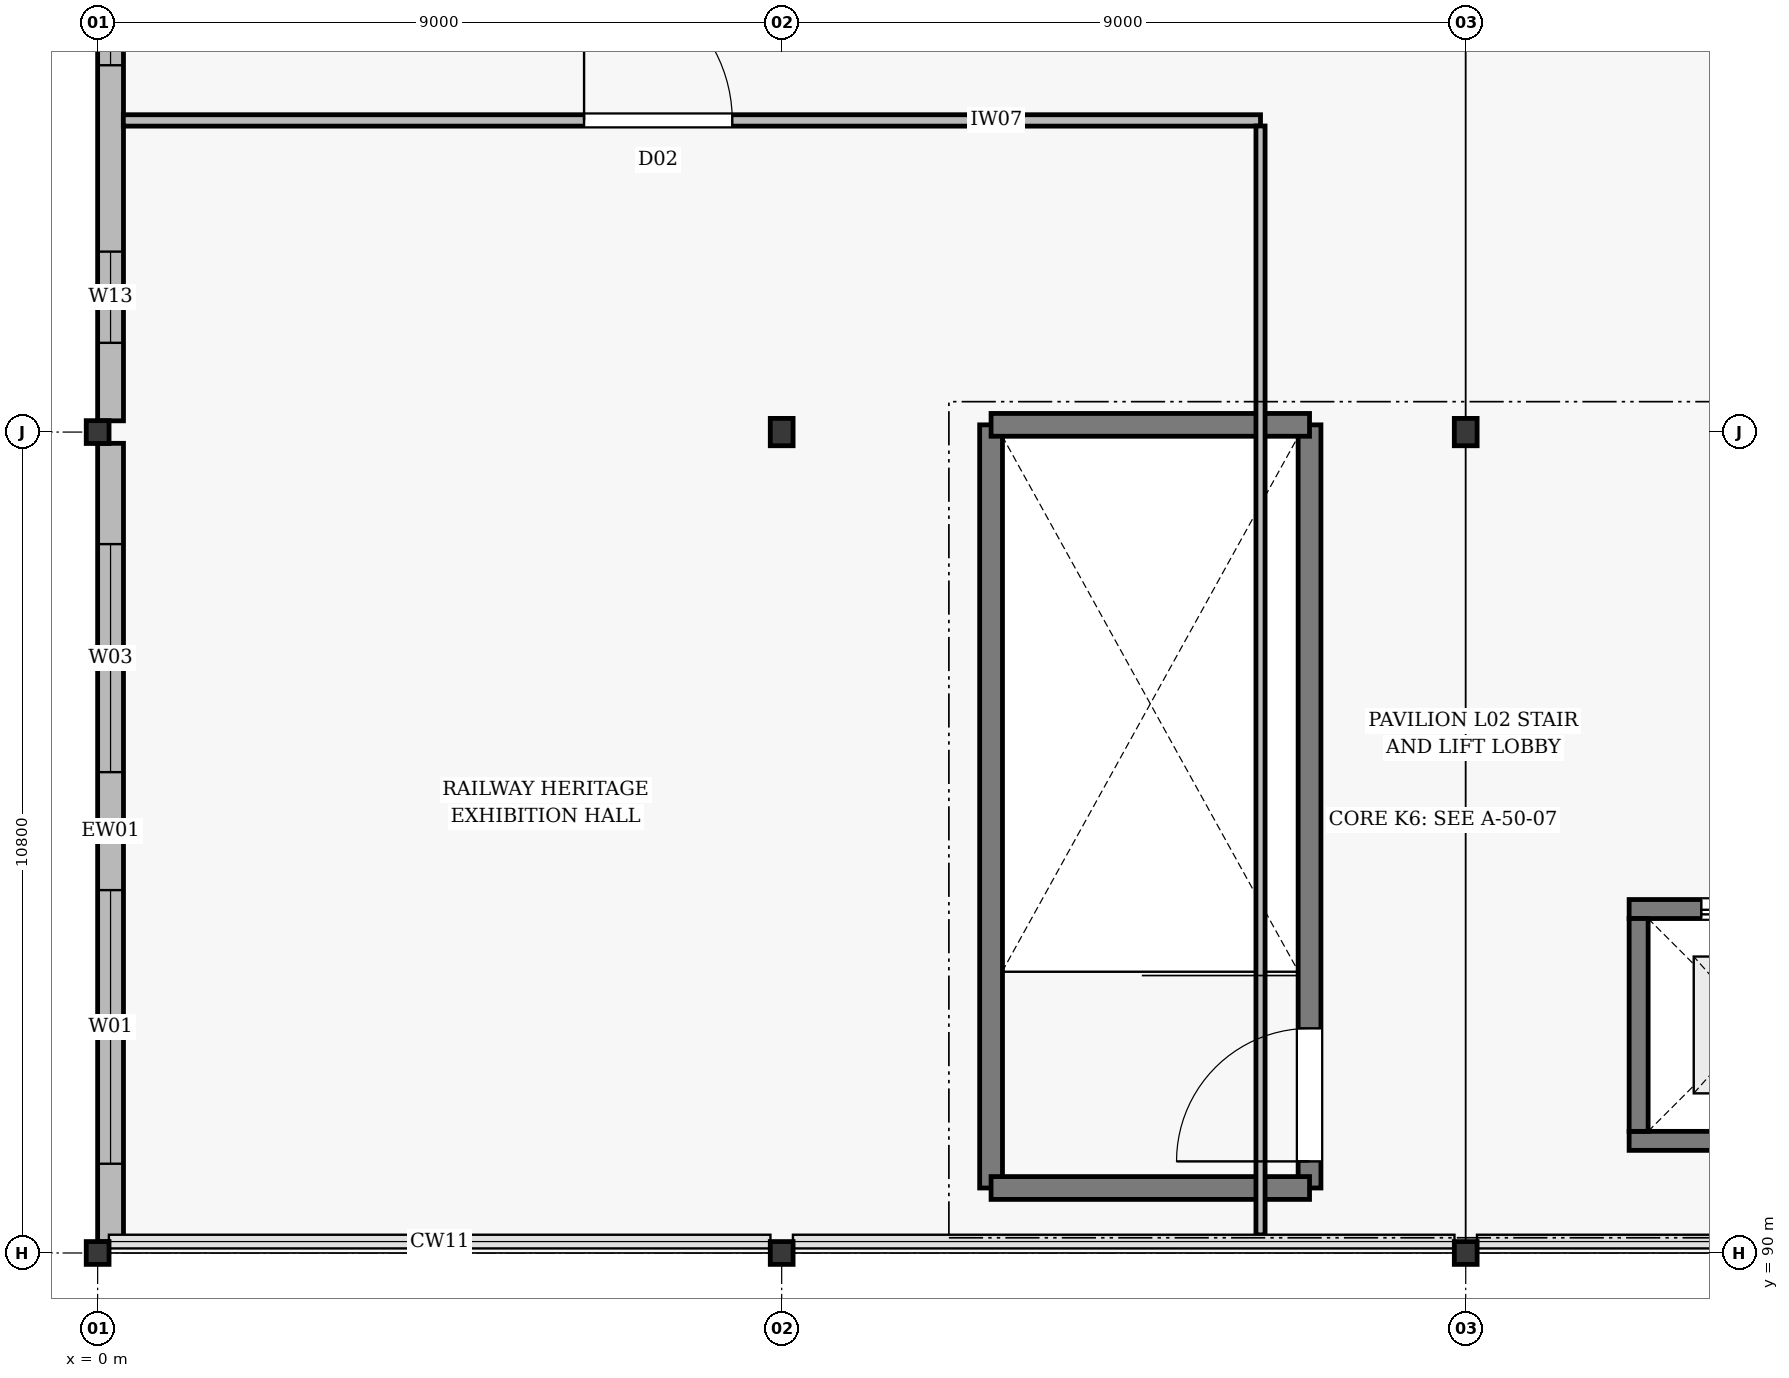
"""IFC4 building model, lengths in metres.
Left out: names, types, materials, properties, quantities, classifications, styles, units other than length and angle.
Written with IfcOpenShell. Run it as: python <this file> out.ifc"""

import sys

from ifc_helpers import new_model, si_unit, direction, frame, frame_2d, origin, origin_2d, place, context, subcontext, project, spatial, rectangle, i_section, extrude, element, fill, save


model = new_model("IFC4")
c1 = context("Model", 3, precision=1e-05, world=origin(), true_north=direction((0.0, 1.0)))
c2 = subcontext(c1, "Body", "Model", "MODEL_VIEW")
j1 = project(units=[si_unit("LENGTHUNIT", "METRE"), si_unit("PLANEANGLEUNIT", "RADIAN")], contexts=[c1])
p1 = place(None, origin())
s1 = spatial("IfcSite", under=j1, at=p1, CompositionType="ELEMENT")
p2 = place(p1, origin())
s2 = spatial("IfcBuilding", under=s1, at=p2, CompositionType="ELEMENT")
p3 = place(p2, frame((0.0, 0.0, 12.6)))
s3 = spatial("IfcBuildingStorey", under=s2, at=p3, CompositionType="ELEMENT", Elevation=12.6)
for number, where, z_axis, x_axis in (
    (1, (0.0, 90.0, 0.0), (0.0, 0.0, 1.0), (1.0, 0.0, 0.0)),
    (2, (0.0, 100.8, 0.0), (0.0, 0.0, 1.0), (1.0, 0.0, 0.0)),
    (3, (9.0, 90.0, 0.0), (0.0, 0.0, 1.0), (1.0, 0.0, 0.0)),
):
    element("IfcColumn", number, at=place(p3, frame(where, z_axis=z_axis, x_axis=x_axis)), inside=s3, PredefinedType="COLUMN", context=c2, shape_type="SweptSolid", body=[
        extrude(i_section(OverallWidth=0.3, OverallDepth=0.3, WebThickness=0.011, FlangeThickness=0.019, at=origin_2d()), origin(), (0.0, 0.0, 1.0), 4.8),
    ])
p4 = place(p3, frame((9.0, 100.8, 0.0), z_axis=(0.0, 0.0, 1.0), x_axis=(1.0, 0.0, 0.0)))
e4 = element("IfcColumn", 4, at=p4, inside=s3, PredefinedType="COLUMN", context=c2, shape_type="SweptSolid", body=[
    extrude(i_section(OverallWidth=0.3, OverallDepth=0.36, WebThickness=0.012, FlangeThickness=0.022, at=origin_2d()), origin(), (0.0, 0.0, 1.0), 4.8),
])
p5 = place(p3, frame((18.0, 90.0, 0.0), z_axis=(0.0, 0.0, 1.0), x_axis=(1.0, 0.0, 0.0)))
e5 = element("IfcColumn", 5, at=p5, inside=s3, PredefinedType="COLUMN", context=c2, shape_type="SweptSolid", body=[
    extrude(i_section(OverallWidth=0.3, OverallDepth=0.3, WebThickness=0.011, FlangeThickness=0.019, at=origin_2d()), origin(), (0.0, 0.0, 1.0), 4.8),
])
p6 = place(p3, frame((18.0, 100.8, 0.0), z_axis=(0.0, 0.0, 1.0), x_axis=(1.0, 0.0, 0.0)))
e6 = element("IfcColumn", 6, at=p6, inside=s3, PredefinedType="COLUMN", context=c2, shape_type="SweptSolid", body=[
    extrude(i_section(OverallWidth=0.3, OverallDepth=0.36, WebThickness=0.012, FlangeThickness=0.022, at=origin_2d()), origin(), (0.0, 0.0, 1.0), 4.8),
])
p7 = place(p3, frame((0.17, 90.148, 0.0), z_axis=(0.0, 0.0, 1.0), x_axis=(0.0, 1.0, 0.0)))
e7 = element("IfcWall", 7, at=p7, inside=s3, PredefinedType="STANDARD", context=c2, shape_type="SweptSolid", body=[
    extrude(rectangle(XDim=10.504, YDim=0.34, at=frame_2d((5.252, 0.0))), origin(), (0.0, 0.0, 1.0), 4.22),
])
p8 = place(p7, frame((1.026, 0.0, 0.75)))
e8 = element("IfcOpeningElement", 8, at=p8, cuts=e7, PredefinedType="OPENING", context=c2, shape_type="SweptSolid", body=[
    extrude(rectangle(XDim=3.6, YDim=2.8, at=frame_2d((1.8, 1.4))), frame((0.0, 0.182, 0.0), z_axis=(0.0, -1.0, 0.0), x_axis=(1.0, 0.0, 0.0)), (0.0, 0.0, 1.0), 0.364),
])
p9 = place(p7, frame((6.178, 0.0, 0.75)))
e9 = element("IfcOpeningElement", 9, at=p9, cuts=e7, PredefinedType="OPENING", context=c2, shape_type="SweptSolid", body=[
    extrude(rectangle(XDim=3.0, YDim=2.6, at=frame_2d((1.5, 1.3))), frame((0.0, 0.182, 0.0), z_axis=(0.0, -1.0, 0.0), x_axis=(1.0, 0.0, 0.0)), (0.0, 0.0, 1.0), 0.364),
])
p10 = place(p3, frame((0.17, 100.948, 0.0), z_axis=(0.0, 0.0, 1.0), x_axis=(0.0, 1.0, 0.0)))
e10 = element("IfcWall", 10, at=p10, inside=s3, PredefinedType="STANDARD", context=c2, shape_type="SweptSolid", body=[
    extrude(rectangle(XDim=10.504, YDim=0.34, at=frame_2d((5.252, 0.0))), origin(), (0.0, 0.0, 1.0), 4.22),
])
p11 = place(p10, frame((1.026, 0.0, 0.75)))
e11 = element("IfcOpeningElement", 11, at=p11, cuts=e10, PredefinedType="OPENING", context=c2, shape_type="SweptSolid", body=[
    extrude(rectangle(XDim=1.2, YDim=1.8, at=frame_2d((0.6, 0.9))), frame((0.0, 0.182, 0.0), z_axis=(0.0, -1.0, 0.0), x_axis=(1.0, 0.0, 0.0)), (0.0, 0.0, 1.0), 0.364),
])
p12 = place(p10, frame((4.678, 0.0, 0.75)))
e12 = element("IfcOpeningElement", 12, at=p12, cuts=e10, PredefinedType="OPENING", context=c2, shape_type="SweptSolid", body=[
    extrude(rectangle(XDim=3.0, YDim=2.6, at=frame_2d((1.5, 1.3))), frame((0.0, 0.182, 0.0), z_axis=(0.0, -1.0, 0.0), x_axis=(1.0, 0.0, 0.0)), (0.0, 0.0, 1.0), 0.364),
])
p13 = place(p3, frame((15.945, 90.855, 0.0), z_axis=(0.0, 0.0, 1.0), x_axis=(0.0, 1.0, 0.0)))
e13 = element("IfcWall", 13, at=p13, inside=s3, PredefinedType="SOLIDWALL", context=c2, shape_type="SweptSolid", body=[
    extrude(rectangle(XDim=10.04, YDim=0.3, at=frame_2d((5.02, 0.0))), origin(), (0.0, 0.0, 1.0), 4.5),
])
p14 = place(p13, frame((0.35, 0.0, 0.005)))
e14 = element("IfcOpeningElement", 14, at=p14, cuts=e13, PredefinedType="OPENING", context=c2, shape_type="SweptSolid", body=[
    extrude(rectangle(XDim=1.75, YDim=2.2, at=frame_2d((0.875, 1.1))), frame((0.0, 0.162, 0.0), z_axis=(0.0, -1.0, 0.0), x_axis=(1.0, 0.0, 0.0)), (0.0, 0.0, 1.0), 0.324),
])
p15 = place(p3, frame((11.755, 90.855, 0.0), z_axis=(0.0, 0.0, 1.0), x_axis=(0.0, 1.0, 0.0)))
e15 = element("IfcWall", 15, at=p15, inside=s3, PredefinedType="SOLIDWALL", context=c2, shape_type="SweptSolid", body=[
    extrude(rectangle(XDim=10.04, YDim=0.3, at=frame_2d((5.02, 0.0))), origin(), (0.0, 0.0, 1.0), 4.5),
])
for number, where, z_axis, x_axis in (
    (16, (15.945, 90.855, 0.0), (0.0, 0.0, 1.0), (-1.0, 0.0, 0.0)),
    (17, (15.945, 100.895, 0.0), (0.0, 0.0, 1.0), (-1.0, 0.0, 0.0)),
):
    element("IfcWall", number, at=place(p3, frame(where, z_axis=z_axis, x_axis=x_axis)), inside=s3, PredefinedType="SOLIDWALL", context=c2, shape_type="SweptSolid", body=[
        extrude(rectangle(XDim=4.19, YDim=0.3, at=frame_2d((2.095, 0.0))), origin(), (0.0, 0.0, 1.0), 4.5),
    ])
p16 = place(p3, frame((20.15, 91.475, 0.0), z_axis=(0.0, 0.0, 1.0), x_axis=(1.0, 0.0, 0.0)))
e18 = element("IfcWall", 18, at=p16, inside=s3, PredefinedType="SOLIDWALL", context=c2, shape_type="SweptSolid", body=[
    extrude(rectangle(XDim=3.3, YDim=0.25, at=frame_2d((1.65, 0.0))), origin(), (0.0, 0.0, 1.0), 3.05),
])
p17 = place(p3, frame((20.15, 94.525, 0.0), z_axis=(0.0, 0.0, 1.0), x_axis=(1.0, 0.0, 0.0)))
e19 = element("IfcWall", 19, at=p17, inside=s3, PredefinedType="SOLIDWALL", context=c2, shape_type="SweptSolid", body=[
    extrude(rectangle(XDim=3.3, YDim=0.25, at=frame_2d((1.65, 0.0))), origin(), (0.0, 0.0, 1.0), 3.05),
])
p18 = place(p17, frame((0.95, 0.0, 0.005)))
e20 = element("IfcOpeningElement", 20, at=p18, cuts=e19, PredefinedType="OPENING", context=c2, shape_type="SweptSolid", body=[
    extrude(rectangle(XDim=1.4, YDim=2.25, at=frame_2d((0.7, 1.125))), frame((0.0, 0.137, 0.0), z_axis=(0.0, -1.0, 0.0), x_axis=(1.0, 0.0, 0.0)), (0.0, 0.0, 1.0), 0.274),
])
p19 = place(p3, frame((20.275, 91.6, 0.0), z_axis=(0.0, 0.0, 1.0), x_axis=(0.0, 1.0, 0.0)))
e21 = element("IfcWall", 21, at=p19, inside=s3, PredefinedType="SOLIDWALL", context=c2, shape_type="SweptSolid", body=[
    extrude(rectangle(XDim=2.8, YDim=0.25, at=frame_2d((1.4, 0.0))), origin(), (0.0, 0.0, 1.0), 3.05),
])
p20 = place(p3, frame((0.338, 104.9, 0.0), z_axis=(0.0, 0.0, 1.0), x_axis=(1.0, 0.0, 0.0)))
e22 = element("IfcWall", 22, at=p20, inside=s3, PredefinedType="PARTITIONING", context=c2, shape_type="SweptSolid", body=[
    extrude(rectangle(XDim=14.962, YDim=0.15, at=frame_2d((7.481, 0.0))), origin(), (0.0, 0.0, 1.0), 4.22),
])
p21 = place(p20, frame((6.062, 0.0, 0.005)))
e23 = element("IfcOpeningElement", 23, at=p21, cuts=e22, PredefinedType="OPENING", context=c2, shape_type="SweptSolid", body=[
    extrude(rectangle(XDim=1.95, YDim=2.3, at=frame_2d((0.975, 1.15))), frame((0.0, 0.087, 0.0), z_axis=(0.0, -1.0, 0.0), x_axis=(1.0, 0.0, 0.0)), (0.0, 0.0, 1.0), 0.174),
])
p22 = place(p3, frame((15.3, 90.238, 0.0), z_axis=(0.0, 0.0, 1.0), x_axis=(0.0, 1.0, 0.0)))
e24 = element("IfcWall", 24, at=p22, inside=s3, PredefinedType="PARTITIONING", context=c2, shape_type="SweptSolid", body=[
    extrude(rectangle(XDim=14.589, YDim=0.12, at=frame_2d((7.294, 0.0))), origin(), (0.0, 0.0, 1.0), 4.22),
])
p23 = place(p8, origin())
e25 = element("IfcWindow", 25, at=p23, inside=s3, PartitioningType="DOUBLE_PANEL_VERTICAL", PredefinedType="WINDOW", context=c2, shape_type="SweptSolid", body=[
    extrude(rectangle(XDim=3.6, YDim=2.8, at=frame_2d((1.8, 1.4))), frame((0.0, 0.03, 0.0), z_axis=(0.0, -1.0, 0.0), x_axis=(1.0, 0.0, 0.0)), (0.0, 0.0, 1.0), 0.06),
])
fill(e8, e25)
p24 = place(p9, origin())
e26 = element("IfcWindow", 26, at=p24, inside=s3, PartitioningType="DOUBLE_PANEL_VERTICAL", PredefinedType="WINDOW", context=c2, shape_type="SweptSolid", body=[
    extrude(rectangle(XDim=3.0, YDim=2.6, at=frame_2d((1.5, 1.3))), frame((0.0, 0.03, 0.0), z_axis=(0.0, -1.0, 0.0), x_axis=(1.0, 0.0, 0.0)), (0.0, 0.0, 1.0), 0.06),
])
fill(e9, e26)
p25 = place(p11, origin())
e27 = element("IfcWindow", 27, at=p25, inside=s3, PartitioningType="DOUBLE_PANEL_VERTICAL", PredefinedType="WINDOW", context=c2, shape_type="SweptSolid", body=[
    extrude(rectangle(XDim=1.2, YDim=1.8, at=frame_2d((0.6, 0.9))), frame((0.0, 0.03, 0.0), z_axis=(0.0, -1.0, 0.0), x_axis=(1.0, 0.0, 0.0)), (0.0, 0.0, 1.0), 0.06),
])
fill(e11, e27)
p26 = place(p12, origin())
e28 = element("IfcWindow", 28, at=p26, inside=s3, PartitioningType="DOUBLE_PANEL_VERTICAL", PredefinedType="WINDOW", context=c2, shape_type="SweptSolid", body=[
    extrude(rectangle(XDim=3.0, YDim=2.6, at=frame_2d((1.5, 1.3))), frame((0.0, 0.03, 0.0), z_axis=(0.0, -1.0, 0.0), x_axis=(1.0, 0.0, 0.0)), (0.0, 0.0, 1.0), 0.06),
])
fill(e12, e28)
p27 = place(p14, origin())
e29 = element("IfcDoor", 29, at=p27, inside=s3, OperationType="SINGLE_SWING_LEFT", PredefinedType="DOOR", context=c2, shape_type="SweptSolid", body=[
    extrude(rectangle(XDim=1.75, YDim=2.2, at=frame_2d((0.875, 1.1))), frame((0.0, 0.025, 0.0), z_axis=(0.0, -1.0, 0.0), x_axis=(1.0, 0.0, 0.0)), (0.0, 0.0, 1.0), 0.05),
])
fill(e14, e29)
p28 = place(p18, origin())
e30 = element("IfcDoor", 30, at=p28, inside=s3, OperationType="SLIDING_TO_LEFT", PredefinedType="DOOR", context=c2, shape_type="SweptSolid", body=[
    extrude(rectangle(XDim=1.4, YDim=2.25, at=frame_2d((0.7, 1.125))), frame((0.0, 0.025, 0.0), z_axis=(0.0, -1.0, 0.0), x_axis=(1.0, 0.0, 0.0)), (0.0, 0.0, 1.0), 0.05),
])
fill(e20, e30)
p29 = place(p21, origin())
e31 = element("IfcDoor", 31, at=p29, inside=s3, OperationType="DOUBLE_DOOR_SINGLE_SWING", PredefinedType="DOOR", context=c2, shape_type="SweptSolid", body=[
    extrude(rectangle(XDim=1.95, YDim=2.3, at=frame_2d((0.975, 1.15))), frame((0.0, 0.025, 0.0), z_axis=(0.0, -1.0, 0.0), x_axis=(1.0, 0.0, 0.0)), (0.0, 0.0, 1.0), 0.05),
])
fill(e23, e31)
save(model, sys.argv[1])
